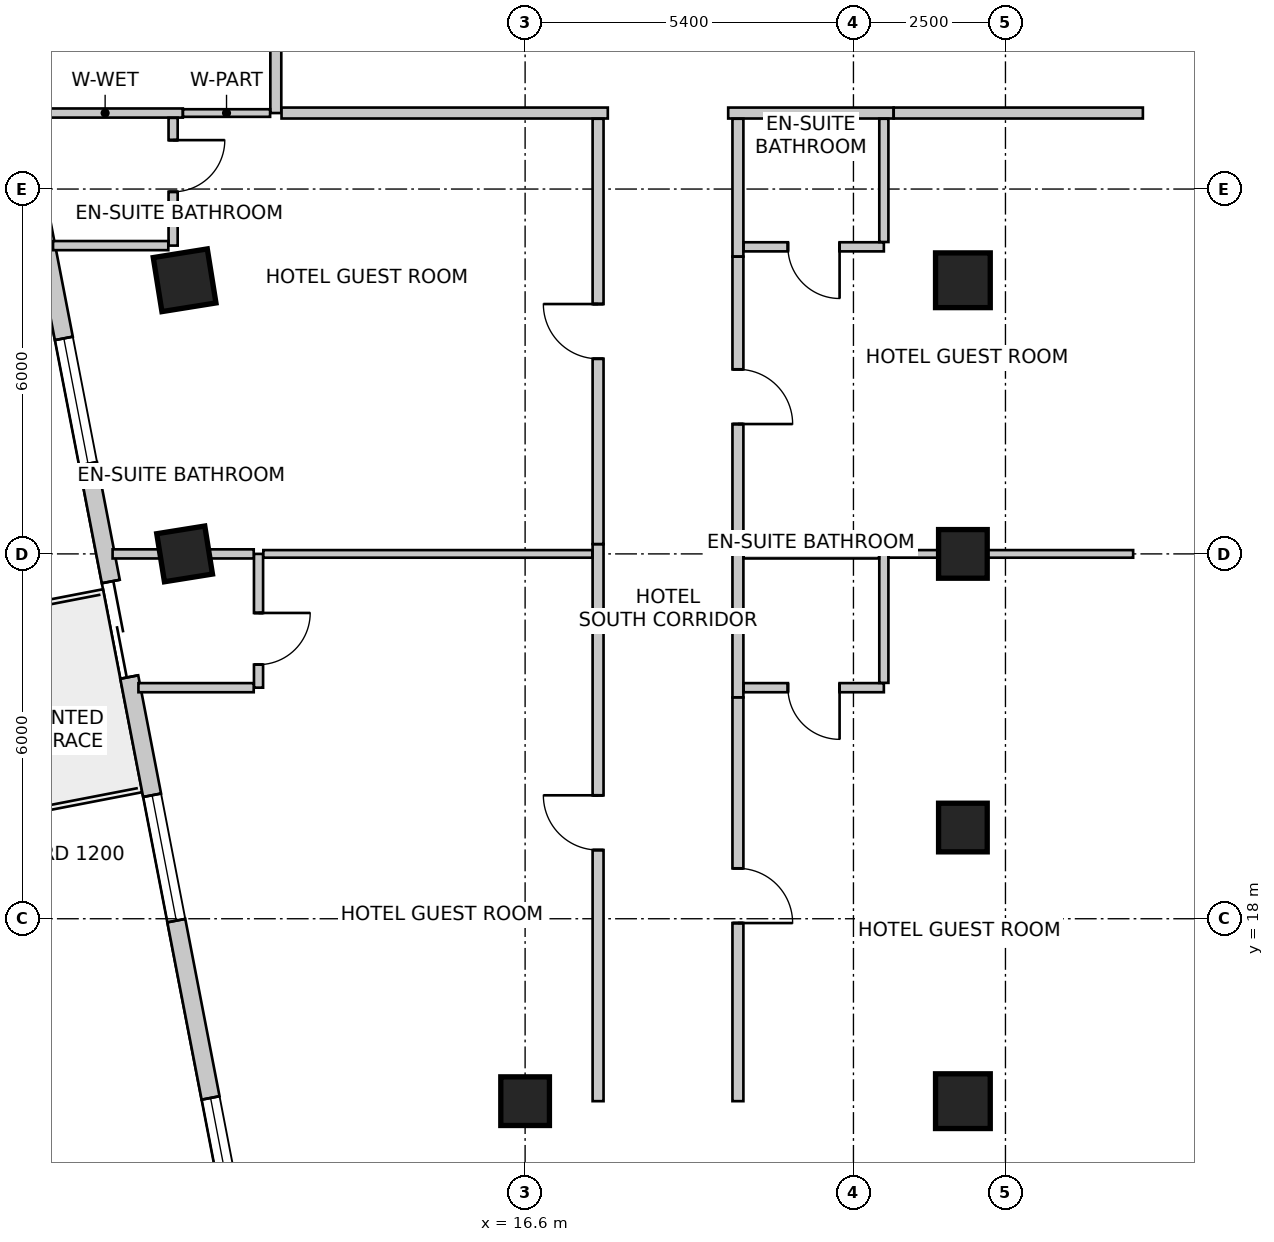
"""IFC4 building model, lengths in metres.
Left out: names, types, materials, properties, quantities, classifications, styles, units other than length and angle.
Written with IfcOpenShell. Run it as: python <this file> out.ifc"""

import sys

from ifc_helpers import new_model, si_unit, direction, frame, frame_2d, origin, origin_2d, place, context, subcontext, project, spatial, rectangle, extrude, source, transform, mapped, element, fill, save


model = new_model("IFC4")
c1 = context("Model", 3, precision=1e-05, world=origin(), true_north=direction((0.0, 1.0)))
c2 = subcontext(c1, "Body", "Model", "MODEL_VIEW")
j1 = project(units=[si_unit("LENGTHUNIT", "METRE"), si_unit("PLANEANGLEUNIT", "RADIAN")], contexts=[c1])
p1 = place(None, origin())
s1 = spatial("IfcSite", under=j1, at=p1, CompositionType="ELEMENT")
p2 = place(p1, origin())
s2 = spatial("IfcBuilding", under=s1, at=p2, CompositionType="ELEMENT")
p3 = place(p2, frame((0.0, 0.0, 117.8)))
s3 = spatial("IfcBuildingStorey", under=s2, at=p3, CompositionType="ELEMENT", Elevation=117.8)
m1 = source(origin(), c2, "Body", "SweptSolid", [
    extrude(rectangle(XDim=0.9, YDim=0.9, at=origin_2d()), origin(), (0.0, 0.0, 1.0), 3.6),
])
p4 = place(p3, frame((11.0, 28.5, 0.0), z_axis=(0.0, 0.0, 1.0), x_axis=(0.158158067254, -0.987413806751, 0.0)))
e1 = element("IfcColumn", 1, at=p4, inside=s3, PredefinedType="COLUMN", context=c2, shape_type="MappedRepresentation", body=[
    mapped(m1, transform((0.0, 0.0, 0.0), scale=1.0)),
])
m2 = source(origin(), c2, "Body", "SweptSolid", [
    extrude(rectangle(XDim=0.8, YDim=0.8, at=origin_2d()), origin(), (0.0, 0.0, 1.0), 3.6),
])
p5 = place(p3, frame((11.0, 24.0, 0.0), z_axis=(0.0, 0.0, 1.0), x_axis=(0.158158067254, -0.987413806751, 0.0)))
e2 = element("IfcColumn", 2, at=p5, inside=s3, PredefinedType="COLUMN", context=c2, shape_type="MappedRepresentation", body=[
    mapped(m2, transform((0.0, 0.0, 0.0), scale=1.0)),
])
p6 = place(p3, frame((23.8, 28.5, 0.0), z_axis=(0.0, 0.0, 1.0), x_axis=(1.0, 0.0, 0.0)))
e3 = element("IfcColumn", 3, at=p6, inside=s3, PredefinedType="COLUMN", context=c2, shape_type="MappedRepresentation", body=[
    mapped(m1, transform((0.0, 0.0, 0.0), scale=1.0)),
])
for number, where, z_axis, x_axis in (
    (4, (23.8, 24.0, 0.0), (0.0, 0.0, 1.0), (1.0, 0.0, 0.0)),
    (5, (23.8, 19.5, 0.0), (0.0, 0.0, 1.0), (1.0, 0.0, 0.0)),
):
    element("IfcColumn", number, at=place(p3, frame(where, z_axis=z_axis, x_axis=x_axis)), inside=s3, PredefinedType="COLUMN", context=c2, shape_type="MappedRepresentation", body=[
        mapped(m2, transform((0.0, 0.0, 0.0), scale=1.0)),
    ])
p7 = place(p3, frame((23.8, 15.0, 0.0), z_axis=(0.0, 0.0, 1.0), x_axis=(1.0, 0.0, 0.0)))
e6 = element("IfcColumn", 6, at=p7, inside=s3, PredefinedType="COLUMN", context=c2, shape_type="MappedRepresentation", body=[
    mapped(m1, transform((0.0, 0.0, 0.0), scale=1.0)),
])
p8 = place(p3, frame((16.6, 15.0, 0.0), z_axis=(0.0, 0.0, 1.0), x_axis=(1.0, 0.0, 0.0)))
e7 = element("IfcColumn", 7, at=p8, inside=s3, PredefinedType="COLUMN", context=c2, shape_type="MappedRepresentation", body=[
    mapped(m2, transform((0.0, 0.0, 0.0), scale=1.0)),
])
p9 = place(p3, frame((13.269, 47.134, 0.0), z_axis=(0.0, 0.0, 1.0), x_axis=(-0.319929596295, -0.947441319246, 0.0)))
e8 = element("IfcWall", 8, at=p9, inside=s3, PredefinedType="SOLIDWALL", context=c2, shape_type="SweptSolid", body=[
    extrude(rectangle(XDim=16.134, YDim=0.3, at=frame_2d((8.067, 0.0))), origin(), (0.0, 0.0, 1.0), 3.35),
])
m3 = source(origin(), c2, "Body", "SweptSolid", [
    extrude(rectangle(XDim=2.4, YDim=2.2, at=frame_2d((1.2, 1.1))), frame((0.0, 0.16, 0.0), z_axis=(0.0, -1.0, 0.0), x_axis=(1.0, 0.0, 0.0)), (0.0, 0.0, 1.0), 0.32),
])
p10 = place(p9, frame((2.276, 0.0, 0.85)))
e9 = element("IfcOpeningElement", 9, at=p10, cuts=e8, PredefinedType="OPENING", context=c2, shape_type="MappedRepresentation", body=[
    mapped(m3, transform((0.0, 0.0, 0.0), scale=1.0)),
])
m4 = source(origin(), c2, "Body", "SweptSolid", [
    extrude(rectangle(XDim=2.1, YDim=2.0, at=frame_2d((1.05, 1.0))), frame((0.0, 0.16, 0.0), z_axis=(0.0, -1.0, 0.0), x_axis=(1.0, 0.0, 0.0)), (0.0, 0.0, 1.0), 0.32),
])
p11 = place(p9, frame((7.361, 0.0, 0.85)))
e10 = element("IfcOpeningElement", 10, at=p11, cuts=e8, PredefinedType="OPENING", context=c2, shape_type="MappedRepresentation", body=[
    mapped(m4, transform((0.0, 0.0, 0.0), scale=1.0)),
])
p12 = place(p9, frame((12.147, 0.0, 0.85)))
e11 = element("IfcOpeningElement", 11, at=p12, cuts=e8, PredefinedType="OPENING", context=c2, shape_type="MappedRepresentation", body=[
    mapped(m3, transform((0.0, 0.0, 0.0), scale=1.0)),
])
p13 = place(p3, frame((8.185, 31.834, 0.0), z_axis=(0.0, 0.0, 1.0), x_axis=(0.189707113148, -0.981840725994, 0.0)))
e12 = element("IfcWall", 12, at=p13, inside=s3, PredefinedType="SOLIDWALL", context=c2, shape_type="SweptSolid", body=[
    extrude(rectangle(XDim=21.221, YDim=0.3, at=frame_2d((10.611, 0.0))), origin(), (0.0, 0.0, 1.0), 3.35),
])
m5 = source(origin(), c2, "Body", "SweptSolid", [
    extrude(rectangle(XDim=1.6, YDim=2.15, at=frame_2d((0.8, 1.075))), frame((0.0, 0.16, 0.0), z_axis=(0.0, -1.0, 0.0), x_axis=(1.0, 0.0, 0.0)), (0.0, 0.0, 1.0), 0.32),
])
p14 = place(p13, frame((8.441, 0.0, 0.0)))
e13 = element("IfcOpeningElement", 13, at=p14, cuts=e12, PredefinedType="OPENING", context=c2, shape_type="MappedRepresentation", body=[
    mapped(m5, transform((0.0, 0.0, 0.0), scale=1.0)),
])
m6 = source(origin(), c2, "Body", "SweptSolid", [
    extrude(rectangle(XDim=1.2, YDim=1.6, at=frame_2d((0.6, 0.8))), frame((0.0, 0.16, 0.0), z_axis=(0.0, -1.0, 0.0), x_axis=(1.0, 0.0, 0.0)), (0.0, 0.0, 1.0), 0.32),
])
p15 = place(p13, frame((1.127, 0.0, 0.85)))
e14 = element("IfcOpeningElement", 14, at=p15, cuts=e12, PredefinedType="OPENING", context=c2, shape_type="MappedRepresentation", body=[
    mapped(m6, transform((0.0, 0.0, 0.0), scale=1.0)),
])
p16 = place(p13, frame((4.369, 0.0, 0.85)))
e15 = element("IfcOpeningElement", 15, at=p16, cuts=e12, PredefinedType="OPENING", context=c2, shape_type="MappedRepresentation", body=[
    mapped(m4, transform((0.0, 0.0, 0.0), scale=1.0)),
])
p17 = place(p13, frame((12.021, 0.0, 0.85)))
e16 = element("IfcOpeningElement", 16, at=p17, cuts=e12, PredefinedType="OPENING", context=c2, shape_type="MappedRepresentation", body=[
    mapped(m4, transform((0.0, 0.0, 0.0), scale=1.0)),
])
p18 = place(p13, frame((17.091, 0.0, 0.85)))
e17 = element("IfcOpeningElement", 17, at=p18, cuts=e12, PredefinedType="OPENING", context=c2, shape_type="MappedRepresentation", body=[
    mapped(m3, transform((0.0, 0.0, 0.0), scale=1.0)),
])
p19 = place(p3, frame((12.5, 31.25, 0.0), z_axis=(0.0, 0.0, 1.0), x_axis=(0.0, 1.0, 0.0)))
e18 = element("IfcWall", 18, at=p19, inside=s3, PredefinedType="PARTITIONING", context=c2, shape_type="SweptSolid", body=[
    extrude(rectangle(XDim=2.2, YDim=0.18, at=frame_2d((1.1, 0.0))), origin(), (0.0, 0.0, 1.0), 3.019),
])
p20 = place(p3, frame((17.96, 31.25, 0.0), z_axis=(0.0, 0.0, 1.0), x_axis=(-1.0, 0.0, 0.0)))
e19 = element("IfcWall", 19, at=p20, inside=s3, PredefinedType="PARTITIONING", context=c2, shape_type="SweptSolid", body=[
    extrude(rectangle(XDim=5.366, YDim=0.18, at=frame_2d((2.683, 0.0))), origin(), (0.0, 0.0, 1.0), 3.019),
])
p21 = place(p3, frame((22.66, 31.25, 0.0), z_axis=(0.0, 0.0, 1.0), x_axis=(-1.0, 0.0, 0.0)))
e20 = element("IfcWall", 20, at=p21, inside=s3, PredefinedType="PARTITIONING", context=c2, shape_type="SweptSolid", body=[
    extrude(rectangle(XDim=2.72, YDim=0.18, at=frame_2d((1.36, 0.0))), origin(), (0.0, 0.0, 1.0), 3.019),
])
p22 = place(p3, frame((26.76, 31.25, 0.0), z_axis=(0.0, 0.0, 1.0), x_axis=(-1.0, 0.0, 0.0)))
e21 = element("IfcWall", 21, at=p22, inside=s3, PredefinedType="PARTITIONING", context=c2, shape_type="SweptSolid", body=[
    extrude(rectangle(XDim=4.098, YDim=0.18, at=frame_2d((2.049, 0.0))), origin(), (0.0, 0.0, 1.0), 3.35),
])
p23 = place(p3, frame((10.971, 31.25, 0.0), z_axis=(0.0, 0.0, 1.0), x_axis=(-1.0, 0.0, 0.0)))
e22 = element("IfcWall", 22, at=p23, inside=s3, PredefinedType="PARTITIONING", context=c2, shape_type="SweptSolid", body=[
    extrude(rectangle(XDim=2.556, YDim=0.15, at=frame_2d((1.278, 0.0))), origin(), (0.0, 0.0, 1.0), 2.492),
])
p24 = place(p3, frame((12.406, 31.25, 0.0), z_axis=(0.0, 0.0, 1.0), x_axis=(-1.0, 0.0, 0.0)))
e23 = element("IfcWall", 23, at=p24, inside=s3, PredefinedType="PARTITIONING", context=c2, shape_type="SweptSolid", body=[
    extrude(rectangle(XDim=1.433, YDim=0.125, at=frame_2d((0.717, 0.0))), origin(), (0.0, 0.0, 1.0), 2.492),
])
p25 = place(p3, frame((17.8, 15.0, 0.0), z_axis=(0.0, 0.0, 1.0), x_axis=(0.0, 1.0, 0.0)))
e24 = element("IfcWall", 24, at=p25, inside=s3, PredefinedType="PARTITIONING", context=c2, shape_type="SweptSolid", body=[
    extrude(rectangle(XDim=9.16, YDim=0.18, at=frame_2d((4.58, 0.0))), origin(), (0.0, 0.0, 1.0), 2.492),
])
m7 = source(origin(), c2, "Body", "SweptSolid", [
    extrude(rectangle(XDim=0.9, YDim=2.15, at=frame_2d((0.45, 1.075))), frame((0.0, 0.1, 0.0), z_axis=(0.0, -1.0, 0.0), x_axis=(1.0, 0.0, 0.0)), (0.0, 0.0, 1.0), 0.2),
])
p26 = place(p25, frame((4.13, 0.0, 0.0)))
e25 = element("IfcOpeningElement", 25, at=p26, cuts=e24, PredefinedType="OPENING", context=c2, shape_type="MappedRepresentation", body=[
    mapped(m7, transform((0.0, 0.0, 0.0), scale=1.0)),
])
p27 = place(p3, frame((20.1, 24.16, 0.0), z_axis=(0.0, 0.0, 1.0), x_axis=(0.0, -1.0, 0.0)))
e26 = element("IfcWall", 26, at=p27, inside=s3, PredefinedType="PARTITIONING", context=c2, shape_type="SweptSolid", body=[
    extrude(rectangle(XDim=2.52, YDim=0.18, at=frame_2d((1.26, 0.0))), origin(), (0.0, 0.0, 1.0), 2.803),
])
p28 = place(p3, frame((20.1, 21.638, 0.0), z_axis=(0.0, 0.0, 1.0), x_axis=(0.0, -1.0, 0.0)))
e27 = element("IfcWall", 27, at=p28, inside=s3, PredefinedType="PARTITIONING", context=c2, shape_type="SweptSolid", body=[
    extrude(rectangle(XDim=6.638, YDim=0.18, at=frame_2d((3.319, 0.0))), origin(), (0.0, 0.0, 1.0), 2.492),
])
p29 = place(p28, frame((2.809, 0.0, 0.0)))
e28 = element("IfcOpeningElement", 28, at=p29, cuts=e27, PredefinedType="OPENING", context=c2, shape_type="MappedRepresentation", body=[
    mapped(m7, transform((0.0, 0.0, 0.0), scale=1.0)),
])
p30 = place(p3, frame((17.8, 24.162, 0.0), z_axis=(0.0, 0.0, 1.0), x_axis=(0.0, 1.0, 0.0)))
e29 = element("IfcWall", 29, at=p30, inside=s3, PredefinedType="PARTITIONING", context=c2, shape_type="SweptSolid", body=[
    extrude(rectangle(XDim=6.994, YDim=0.18, at=frame_2d((3.497, 0.0))), origin(), (0.0, 0.0, 1.0), 2.803),
])
p31 = place(p30, frame((3.047, 0.0, 0.0)))
e30 = element("IfcOpeningElement", 30, at=p31, cuts=e29, PredefinedType="OPENING", context=c2, shape_type="MappedRepresentation", body=[
    mapped(m7, transform((0.0, 0.0, 0.0), scale=1.0)),
])
p32 = place(p3, frame((20.1, 31.156, 0.0), z_axis=(0.0, 0.0, 1.0), x_axis=(0.0, -1.0, 0.0)))
e31 = element("IfcWall", 31, at=p32, inside=s3, PredefinedType="PARTITIONING", context=c2, shape_type="SweptSolid", body=[
    extrude(rectangle(XDim=2.266, YDim=0.18, at=frame_2d((1.133, 0.0))), origin(), (0.0, 0.0, 1.0), 3.019),
])
p33 = place(p3, frame((20.1, 28.888, 0.0), z_axis=(0.0, 0.0, 1.0), x_axis=(0.0, -1.0, 0.0)))
e32 = element("IfcWall", 32, at=p33, inside=s3, PredefinedType="PARTITIONING", context=c2, shape_type="SweptSolid", body=[
    extrude(rectangle(XDim=4.726, YDim=0.18, at=frame_2d((2.363, 0.0))), origin(), (0.0, 0.0, 1.0), 2.803),
])
p34 = place(p33, frame((1.853, 0.0, 0.0)))
e33 = element("IfcOpeningElement", 33, at=p34, cuts=e32, PredefinedType="OPENING", context=c2, shape_type="MappedRepresentation", body=[
    mapped(m7, transform((0.0, 0.0, 0.0), scale=1.0)),
])
p35 = place(p3, frame((12.216, 24.0, 0.0), z_axis=(0.0, 0.0, 1.0), x_axis=(0.0, -1.0, 0.0)))
e34 = element("IfcWall", 34, at=p35, inside=s3, PredefinedType="PARTITIONING", context=c2, shape_type="SweptSolid", body=[
    extrude(rectangle(XDim=2.2, YDim=0.15, at=frame_2d((1.1, 0.0))), origin(), (0.0, 0.0, 1.0), 2.803),
])
m8 = source(origin(), c2, "Body", "SweptSolid", [
    extrude(rectangle(XDim=0.85, YDim=2.15, at=frame_2d((0.425, 1.075))), frame((0.0, 0.085, 0.0), z_axis=(0.0, -1.0, 0.0), x_axis=(1.0, 0.0, 0.0)), (0.0, 0.0, 1.0), 0.17),
])
p36 = place(p35, frame((0.971, 0.0, 0.0)))
e35 = element("IfcOpeningElement", 35, at=p36, cuts=e34, PredefinedType="OPENING", context=c2, shape_type="MappedRepresentation", body=[
    mapped(m8, transform((0.0, 0.0, 0.0), scale=1.0)),
])
p37 = place(p3, frame((12.137, 21.8, 0.0), z_axis=(0.0, 0.0, 1.0), x_axis=(-1.0, 0.0, 0.0)))
e36 = element("IfcWall", 36, at=p37, inside=s3, PredefinedType="PARTITIONING", context=c2, shape_type="SweptSolid", body=[
    extrude(rectangle(XDim=1.896, YDim=0.15, at=frame_2d((0.948, 0.0))), origin(), (0.0, 0.0, 1.0), 3.35),
])
p38 = place(p3, frame((9.816, 24.0, 0.0), z_axis=(0.0, 0.0, 1.0), x_axis=(1.0, 0.0, 0.0)))
e37 = element("IfcWall", 37, at=p38, inside=s3, PredefinedType="PARTITIONING", context=c2, shape_type="SweptSolid", body=[
    extrude(rectangle(XDim=2.321, YDim=0.15, at=frame_2d((1.161, 0.0))), origin(), (0.0, 0.0, 1.0), 2.492),
])
p39 = place(p3, frame((12.295, 24.0, 0.0), z_axis=(0.0, 0.0, 1.0), x_axis=(1.0, 0.0, 0.0)))
e38 = element("IfcWall", 38, at=p39, inside=s3, PredefinedType="PARTITIONING", context=c2, shape_type="SweptSolid", body=[
    extrude(rectangle(XDim=5.411, YDim=0.125, at=frame_2d((2.706, 0.0))), origin(), (0.0, 0.0, 1.0), 2.803),
])
p40 = place(p3, frame((22.5, 21.8, 0.0), z_axis=(0.0, 0.0, 1.0), x_axis=(-1.0, 0.0, 0.0)))
e39 = element("IfcWall", 39, at=p40, inside=s3, PredefinedType="PARTITIONING", context=c2, shape_type="SweptSolid", body=[
    extrude(rectangle(XDim=2.306, YDim=0.15, at=frame_2d((1.153, 0.0))), origin(), (0.0, 0.0, 1.0), 3.35),
])
p41 = place(p40, frame((0.728, 0.0, 0.0)))
e40 = element("IfcOpeningElement", 40, at=p41, cuts=e39, PredefinedType="OPENING", context=c2, shape_type="MappedRepresentation", body=[
    mapped(m8, transform((0.0, 0.0, 0.0), scale=1.0)),
])
p42 = place(p3, frame((22.5, 24.0, 0.0), z_axis=(0.0, 0.0, 1.0), x_axis=(0.0, -1.0, 0.0)))
e41 = element("IfcWall", 41, at=p42, inside=s3, PredefinedType="PARTITIONING", context=c2, shape_type="SweptSolid", body=[
    extrude(rectangle(XDim=2.121, YDim=0.15, at=frame_2d((1.061, 0.0))), origin(), (0.0, 0.0, 1.0), 2.803),
])
p43 = place(p3, frame((20.194, 24.0, 0.0), z_axis=(0.0, 0.0, 1.0), x_axis=(1.0, 0.0, 0.0)))
e42 = element("IfcWall", 42, at=p43, inside=s3, PredefinedType="PARTITIONING", context=c2, shape_type="SweptSolid", body=[
    extrude(rectangle(XDim=2.227, YDim=0.15, at=frame_2d((1.113, 0.0))), origin(), (0.0, 0.0, 1.0), 2.803),
])
p44 = place(p3, frame((22.579, 24.0, 0.0), z_axis=(0.0, 0.0, 1.0), x_axis=(1.0, 0.0, 0.0)))
e43 = element("IfcWall", 43, at=p44, inside=s3, PredefinedType="PARTITIONING", context=c2, shape_type="SweptSolid", body=[
    extrude(rectangle(XDim=4.021, YDim=0.125, at=frame_2d((2.01, 0.0))), origin(), (0.0, 0.0, 1.0), 2.492),
])
p45 = place(p3, frame((10.811, 31.171, 0.0), z_axis=(0.0, 0.0, 1.0), x_axis=(0.0, -1.0, 0.0)))
e44 = element("IfcWall", 44, at=p45, inside=s3, PredefinedType="PARTITIONING", context=c2, shape_type="SweptSolid", body=[
    extrude(rectangle(XDim=2.101, YDim=0.15, at=frame_2d((1.05, 0.0))), origin(), (0.0, 0.0, 1.0), 2.492),
])
p46 = place(p45, frame((0.366, 0.0, 0.0)))
e45 = element("IfcOpeningElement", 45, at=p46, cuts=e44, PredefinedType="OPENING", context=c2, shape_type="MappedRepresentation", body=[
    mapped(m8, transform((0.0, 0.0, 0.0), scale=1.0)),
])
p47 = place(p3, frame((10.732, 29.07, 0.0), z_axis=(0.0, 0.0, 1.0), x_axis=(-1.0, 0.0, 0.0)))
e46 = element("IfcWall", 46, at=p47, inside=s3, PredefinedType="PARTITIONING", context=c2, shape_type="SweptSolid", body=[
    extrude(rectangle(XDim=1.896, YDim=0.15, at=frame_2d((0.948, 0.0))), origin(), (0.0, 0.0, 1.0), 3.35),
])
p48 = place(p3, frame((22.5, 29.05, 0.0), z_axis=(0.0, 0.0, 1.0), x_axis=(-1.0, 0.0, 0.0)))
e47 = element("IfcWall", 47, at=p48, inside=s3, PredefinedType="PARTITIONING", context=c2, shape_type="SweptSolid", body=[
    extrude(rectangle(XDim=2.306, YDim=0.15, at=frame_2d((1.153, 0.0))), origin(), (0.0, 0.0, 1.0), 3.019),
])
p49 = place(p48, frame((0.728, 0.0, 0.0)))
e48 = element("IfcOpeningElement", 48, at=p49, cuts=e47, PredefinedType="OPENING", context=c2, shape_type="MappedRepresentation", body=[
    mapped(m8, transform((0.0, 0.0, 0.0), scale=1.0)),
])
p50 = place(p3, frame((22.5, 31.156, 0.0), z_axis=(0.0, 0.0, 1.0), x_axis=(0.0, -1.0, 0.0)))
e49 = element("IfcWall", 49, at=p50, inside=s3, PredefinedType="PARTITIONING", context=c2, shape_type="SweptSolid", body=[
    extrude(rectangle(XDim=2.027, YDim=0.15, at=frame_2d((1.014, 0.0))), origin(), (0.0, 0.0, 1.0), 3.019),
])
m9 = source(origin(), c2, "Body", "SweptSolid", [
    extrude(rectangle(XDim=1.6, YDim=2.15, at=frame_2d((0.8, 1.075))), frame((0.0, 0.025, 0.0), z_axis=(0.0, -1.0, 0.0), x_axis=(1.0, 0.0, 0.0)), (0.0, 0.0, 1.0), 0.05),
])
p51 = place(p14, origin())
e50 = element("IfcDoor", 50, at=p51, inside=s3, OperationType="DOUBLE_DOOR_SLIDING", PredefinedType="DOOR", context=c2, shape_type="MappedRepresentation", body=[
    mapped(m9, transform((0.0, 0.0, 0.0), scale=1.0)),
])
fill(e13, e50)
m10 = source(origin(), c2, "Body", "SweptSolid", [
    extrude(rectangle(XDim=2.1, YDim=2.0, at=frame_2d((1.05, 1.0))), frame((0.0, -0.015, 0.0), z_axis=(0.0, -1.0, 0.0), x_axis=(1.0, 0.0, 0.0)), (0.0, 0.0, 1.0), 0.06),
])
p52 = place(p16, origin())
e51 = element("IfcWindow", 51, at=p52, inside=s3, PartitioningType="SINGLE_PANEL", PredefinedType="WINDOW", context=c2, shape_type="MappedRepresentation", body=[
    mapped(m10, transform((0.0, 0.0, 0.0), scale=1.0)),
])
fill(e15, e51)
p53 = place(p17, origin())
e52 = element("IfcWindow", 52, at=p53, inside=s3, PartitioningType="SINGLE_PANEL", PredefinedType="WINDOW", context=c2, shape_type="MappedRepresentation", body=[
    mapped(m10, transform((0.0, 0.0, 0.0), scale=1.0)),
])
fill(e16, e52)
m11 = source(origin(), c2, "Body", "SweptSolid", [
    extrude(rectangle(XDim=2.4, YDim=2.2, at=frame_2d((1.2, 1.1))), frame((0.0, -0.015, 0.0), z_axis=(0.0, -1.0, 0.0), x_axis=(1.0, 0.0, 0.0)), (0.0, 0.0, 1.0), 0.06),
])
p54 = place(p18, origin())
e53 = element("IfcWindow", 53, at=p54, inside=s3, PartitioningType="SINGLE_PANEL", PredefinedType="WINDOW", context=c2, shape_type="MappedRepresentation", body=[
    mapped(m11, transform((0.0, 0.0, 0.0), scale=1.0)),
])
fill(e17, e53)
m12 = source(origin(), c2, "Body", "SweptSolid", [
    extrude(rectangle(XDim=0.85, YDim=2.15, at=frame_2d((0.425, 1.075))), frame((0.0, 0.025, 0.0), z_axis=(0.0, -1.0, 0.0), x_axis=(1.0, 0.0, 0.0)), (0.0, 0.0, 1.0), 0.05),
])
p55 = place(p36, origin())
e54 = element("IfcDoor", 54, at=p55, inside=s3, OperationType="SINGLE_SWING_LEFT", PredefinedType="DOOR", context=c2, shape_type="MappedRepresentation", body=[
    mapped(m12, transform((0.0, 0.0, 0.0), scale=1.0)),
])
fill(e35, e54)
m13 = source(origin(), c2, "Body", "SweptSolid", [
    extrude(rectangle(XDim=0.9, YDim=2.15, at=frame_2d((0.45, 1.075))), frame((0.0, 0.025, 0.0), z_axis=(0.0, -1.0, 0.0), x_axis=(1.0, 0.0, 0.0)), (0.0, 0.0, 1.0), 0.05),
])
p56 = place(p26, origin())
e55 = element("IfcDoor", 55, at=p56, inside=s3, OperationType="SINGLE_SWING_RIGHT", PredefinedType="DOOR", context=c2, shape_type="MappedRepresentation", body=[
    mapped(m13, transform((0.0, 0.0, 0.0), scale=1.0)),
])
fill(e25, e55)
p57 = place(p41, origin())
e56 = element("IfcDoor", 56, at=p57, inside=s3, OperationType="SINGLE_SWING_LEFT", PredefinedType="DOOR", context=c2, shape_type="MappedRepresentation", body=[
    mapped(m12, transform((0.0, 0.0, 0.0), scale=1.0)),
])
fill(e40, e56)
p58 = place(p29, origin())
e57 = element("IfcDoor", 57, at=p58, inside=s3, OperationType="SINGLE_SWING_RIGHT", PredefinedType="DOOR", context=c2, shape_type="MappedRepresentation", body=[
    mapped(m13, transform((0.0, 0.0, 0.0), scale=1.0)),
])
fill(e28, e57)
p59 = place(p46, origin())
e58 = element("IfcDoor", 58, at=p59, inside=s3, OperationType="SINGLE_SWING_LEFT", PredefinedType="DOOR", context=c2, shape_type="MappedRepresentation", body=[
    mapped(m12, transform((0.0, 0.0, 0.0), scale=1.0)),
])
fill(e45, e58)
p60 = place(p31, origin())
e59 = element("IfcDoor", 59, at=p60, inside=s3, OperationType="SINGLE_SWING_RIGHT", PredefinedType="DOOR", context=c2, shape_type="MappedRepresentation", body=[
    mapped(m13, transform((0.0, 0.0, 0.0), scale=1.0)),
])
fill(e30, e59)
p61 = place(p49, origin())
e60 = element("IfcDoor", 60, at=p61, inside=s3, OperationType="SINGLE_SWING_LEFT", PredefinedType="DOOR", context=c2, shape_type="MappedRepresentation", body=[
    mapped(m12, transform((0.0, 0.0, 0.0), scale=1.0)),
])
fill(e48, e60)
p62 = place(p34, origin())
e61 = element("IfcDoor", 61, at=p62, inside=s3, OperationType="SINGLE_SWING_RIGHT", PredefinedType="DOOR", context=c2, shape_type="MappedRepresentation", body=[
    mapped(m13, transform((0.0, 0.0, 0.0), scale=1.0)),
])
fill(e33, e61)
save(model, sys.argv[1])
